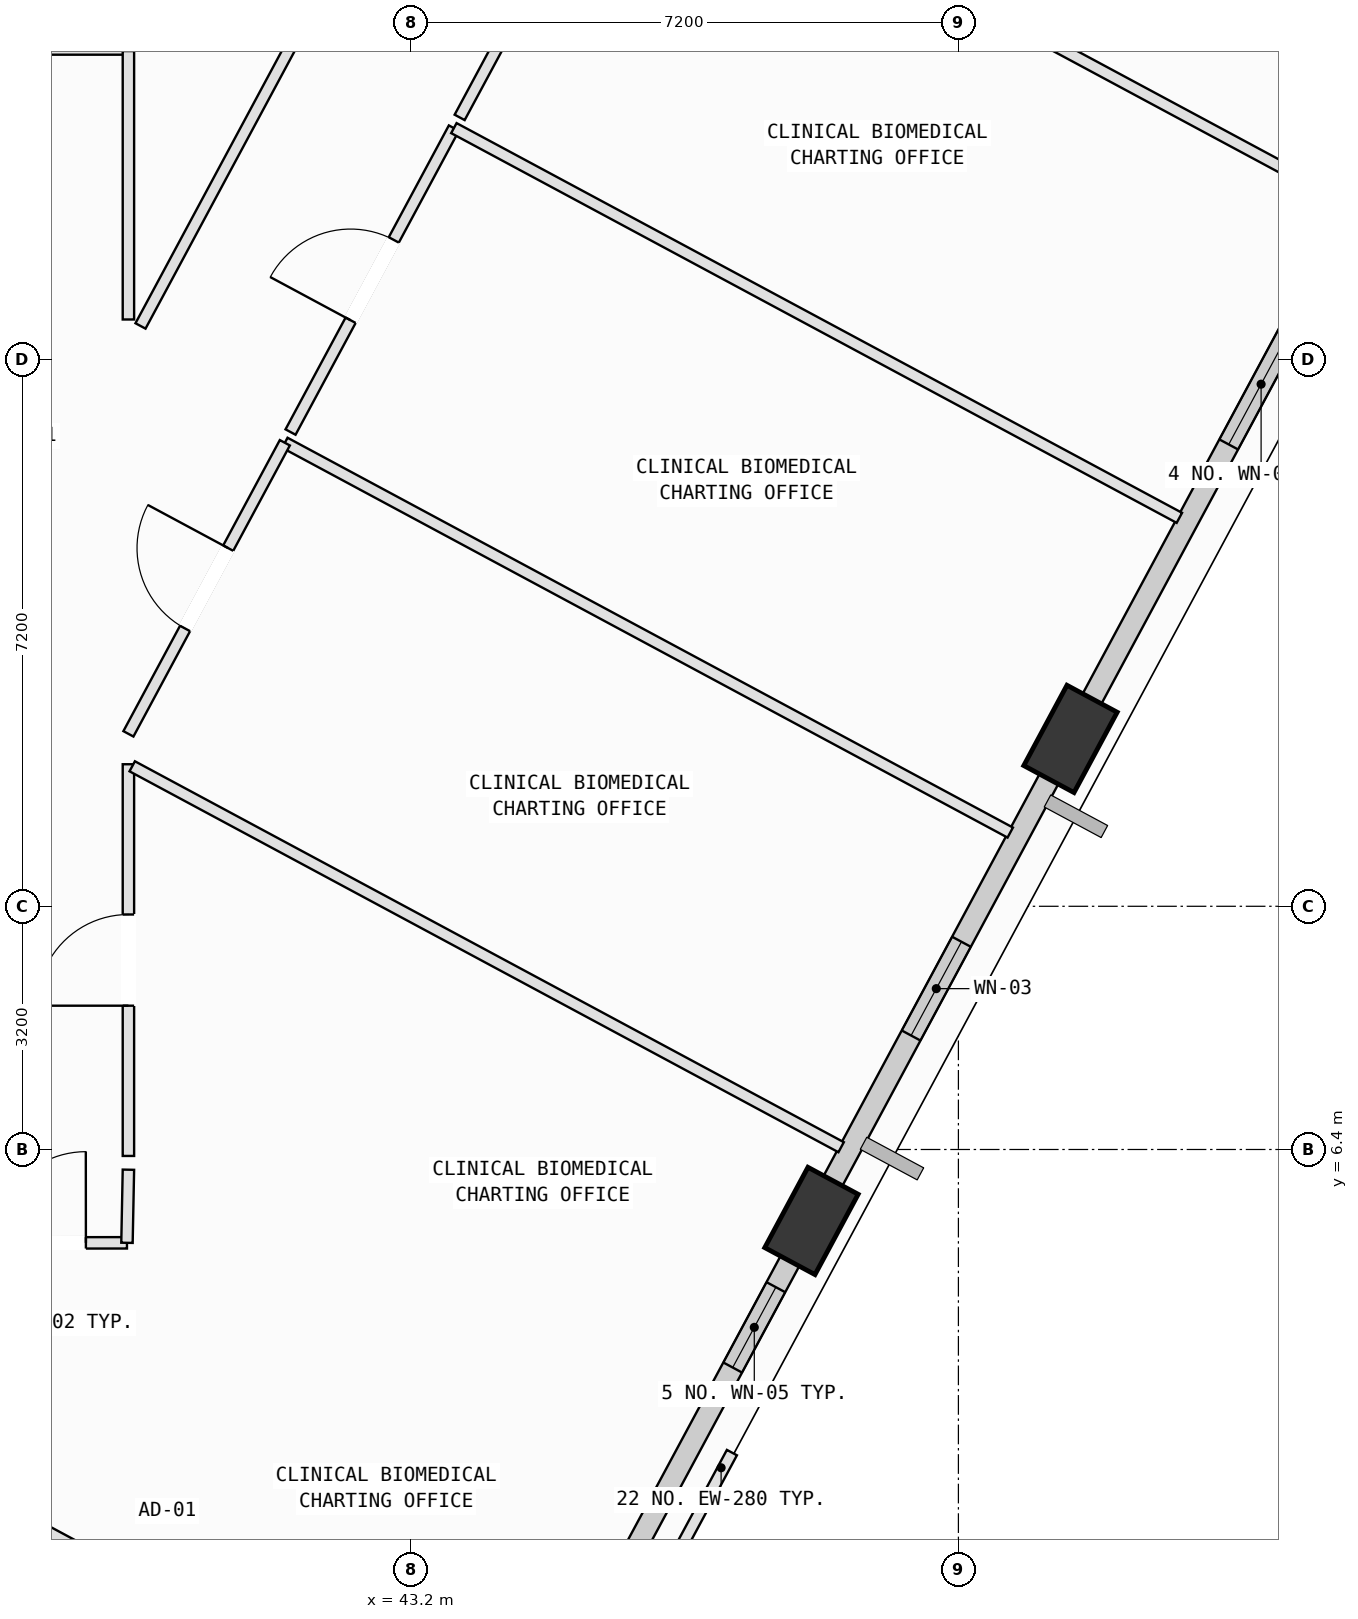
"""IFC4 building model, lengths in metres.
Left out: names, types, materials, properties, quantities, classifications, styles, units other than length and angle.
Written with IfcOpenShell. Run it as: python <this file> out.ifc"""

import sys

from ifc_helpers import new_model, si_unit, direction, frame, frame_2d, origin, origin_2d, place, context, subcontext, project, spatial, rectangle, extrude, element, fill, save


model = new_model("IFC4")
c1 = context("Model", 3, precision=1e-05, world=origin(), true_north=direction((0.0, 1.0)))
c2 = subcontext(c1, "Body", "Model", "MODEL_VIEW")
j1 = project(units=[si_unit("LENGTHUNIT", "METRE"), si_unit("PLANEANGLEUNIT", "RADIAN")], contexts=[c1])
p1 = place(None, origin())
s1 = spatial("IfcSite", under=j1, at=p1, CompositionType="ELEMENT")
p2 = place(p1, origin())
s2 = spatial("IfcBuilding", under=s1, at=p2, CompositionType="ELEMENT")
p3 = place(p2, frame((0.0, 0.0, 288.6)))
s3 = spatial("IfcBuildingStorey", under=s2, at=p3, CompositionType="ELEMENT", Elevation=288.6)
p4 = place(p3, frame((48.467, 5.46, 0.002), z_axis=(0.079258737557, 0.061936084026, 0.99492812505), x_axis=(-0.98201925884, -0.16669404877, 0.08860738892)))
e1 = element("IfcColumn", 1, at=p4, inside=s3, PredefinedType="COLUMN", context=c2, shape_type="SweptSolid", body=[
    extrude(rectangle(XDim=1.2, YDim=0.75, at=origin_2d()), origin(), (0.0, 0.0, 1.0), 4.017),
])
p5 = place(p3, frame((51.875, 11.802, 0.002), z_axis=(0.053042740852, 0.075853552572, 0.995707138774), x_axis=(-0.890530917938, -0.447556403311, 0.081534962146)))
e2 = element("IfcColumn", 2, at=p5, inside=s3, PredefinedType="COLUMN", context=c2, shape_type="SweptSolid", body=[
    extrude(rectangle(XDim=1.2, YDim=0.75, at=origin_2d()), origin(), (0.0, 0.0, 1.0), 4.014),
])
p6 = place(p3, frame((55.282, 18.145, 0.002), z_axis=(0.026701241209, 0.089713737548, 0.99560960673), x_axis=(-0.70383349377, -0.705563431999, 0.082453965787)))
e3 = element("IfcColumn", 3, at=p6, inside=s3, PredefinedType="COLUMN", context=c2, shape_type="SweptSolid", body=[
    extrude(rectangle(XDim=1.2, YDim=0.75, at=origin_2d()), origin(), (0.0, 0.0, 1.0), 4.014),
])
p7 = place(p3, frame((48.37, 5.28, 0.0), z_axis=(0.0, 0.0, 1.0), x_axis=(-0.473335362581, -0.880882304584, 0.0)))
e4 = element("IfcWall", 4, at=p7, inside=s3, PredefinedType="SOLIDWALL", context=c2, shape_type="SweptSolid", body=[
    extrude(rectangle(XDim=6.438, YDim=0.28, at=frame_2d((3.219, 0.0))), origin(), (0.0, 0.0, 1.0), 3.265),
])
p8 = place(p7, frame((0.785, 0.0, 0.75)))
e5 = element("IfcOpeningElement", 5, at=p8, cuts=e4, PredefinedType="OPENING", context=c2, shape_type="SweptSolid", body=[
    extrude(rectangle(XDim=1.2, YDim=1.75, at=frame_2d((0.6, 0.875))), frame((0.0, 0.15, 0.0), z_axis=(0.0, -1.0, 0.0), x_axis=(1.0, 0.0, 0.0)), (0.0, 0.0, 1.0), 0.3),
])
p9 = place(p7, frame((4.705, 0.0, 0.75)))
e6 = element("IfcOpeningElement", 6, at=p9, cuts=e4, PredefinedType="OPENING", context=c2, shape_type="SweptSolid", body=[
    extrude(rectangle(XDim=1.2, YDim=1.75, at=frame_2d((0.6, 0.875))), frame((0.0, 0.15, 0.0), z_axis=(0.0, -1.0, 0.0), x_axis=(1.0, 0.0, 0.0)), (0.0, 0.0, 1.0), 0.3),
])
p10 = place(p3, frame((51.774, 11.615, 0.0), z_axis=(0.0, 0.0, 1.0), x_axis=(-0.473332354162, -0.880883921129, 0.0)))
e7 = element("IfcWall", 7, at=p10, inside=s3, PredefinedType="SOLIDWALL", context=c2, shape_type="SweptSolid", body=[
    extrude(rectangle(XDim=6.413, YDim=0.28, at=frame_2d((3.207, 0.0))), origin(), (0.0, 0.0, 1.0), 3.265),
])
p11 = place(p10, frame((2.818, 0.0, 0.75)))
e8 = element("IfcOpeningElement", 8, at=p11, cuts=e7, PredefinedType="OPENING", context=c2, shape_type="SweptSolid", body=[
    extrude(rectangle(XDim=1.4, YDim=1.85, at=frame_2d((0.7, 0.925))), frame((0.0, 0.15, 0.0), z_axis=(0.0, -1.0, 0.0), x_axis=(1.0, 0.0, 0.0)), (0.0, 0.0, 1.0), 0.3),
])
p12 = place(p3, frame((55.182, 17.958, 0.0), z_axis=(0.0, 0.0, 1.0), x_axis=(-0.47331339391, -0.880894108929, 0.0)))
e9 = element("IfcWall", 9, at=p12, inside=s3, PredefinedType="SOLIDWALL", context=c2, shape_type="SweptSolid", body=[
    extrude(rectangle(XDim=6.407, YDim=0.28, at=frame_2d((3.204, 0.0))), origin(), (0.0, 0.0, 1.0), 3.265),
])
p13 = place(p12, frame((0.79, 0.0, 0.75)))
e10 = element("IfcOpeningElement", 10, at=p13, cuts=e9, PredefinedType="OPENING", context=c2, shape_type="SweptSolid", body=[
    extrude(rectangle(XDim=1.8, YDim=2.05, at=frame_2d((0.9, 1.025))), frame((0.0, 0.15, 0.0), z_axis=(0.0, -1.0, 0.0), x_axis=(1.0, 0.0, 0.0)), (0.0, 0.0, 1.0), 0.3),
])
p14 = place(p3, frame((34.864, 3.278, 0.0), z_axis=(0.0, 0.0, 1.0), x_axis=(0.880889698019, -0.473321603062, 0.0)))
e11 = element("IfcWall", 11, at=p14, inside=s3, PredefinedType="PARTITIONING", context=c2, shape_type="SweptSolid", body=[
    extrude(rectangle(XDim=10.834, YDim=0.15, at=frame_2d((5.417, 0.0))), origin(), (0.0, 0.0, 1.0), 3.78),
])
p15 = place(p14, frame((4.987, 0.0, 0.0)))
e12 = element("IfcOpeningElement", 12, at=p15, cuts=e11, PredefinedType="OPENING", context=c2, shape_type="SweptSolid", body=[
    extrude(rectangle(XDim=0.86, YDim=2.06, at=frame_2d((0.43, 1.03))), frame((0.0, 0.085, 0.0), z_axis=(0.0, -1.0, 0.0), x_axis=(1.0, 0.0, 0.0)), (0.0, 0.0, 1.0), 0.17),
])
p16 = place(p3, frame((37.18, 5.17, 0.0), z_axis=(0.0, 0.0, 1.0), x_axis=(0.999999536038, 0.000963287576, 0.0)))
e13 = element("IfcWall", 13, at=p16, inside=s3, PredefinedType="PARTITIONING", context=c2, shape_type="SweptSolid", body=[
    extrude(rectangle(XDim=2.281, YDim=0.15, at=frame_2d((1.141, 0.0))), origin(), (0.0, 0.0, 1.0), 3.78),
])
p17 = place(p16, frame((0.541, 0.0, 0.0)))
e14 = element("IfcOpeningElement", 14, at=p17, cuts=e13, PredefinedType="OPENING", context=c2, shape_type="SweptSolid", body=[
    extrude(rectangle(XDim=1.2, YDim=2.15, at=frame_2d((0.6, 1.075))), frame((0.0, 0.085, 0.0), z_axis=(0.0, -1.0, 0.0), x_axis=(1.0, 0.0, 0.0)), (0.0, 0.0, 1.0), 0.17),
])
p18 = place(p3, frame((39.461, 5.172, 0.0), z_axis=(0.0, 0.0, 1.0), x_axis=(0.019793076049, 0.999804097881, 0.0)))
e15 = element("IfcWall", 15, at=p18, inside=s3, PredefinedType="PARTITIONING", context=c2, shape_type="SweptSolid", body=[
    extrude(rectangle(XDim=0.962, YDim=0.15, at=frame_2d((0.481, 0.0))), origin(), (0.0, 0.0, 1.0), 3.78),
])
p19 = place(p3, frame((48.941, 5.857, 0.0), z_axis=(0.0, 0.0, 1.0), x_axis=(-0.473595091589, -0.880742691836, 0.0)))
e16 = element("IfcWall", 16, at=p19, inside=s3, PredefinedType="PARTITIONING", context=c2, shape_type="SweptSolid", body=[
    extrude(rectangle(XDim=0.779, YDim=0.15, at=frame_2d((0.389, 0.0))), origin(), (0.0, 0.0, 1.0), 3.265),
])
p20 = place(p3, frame((39.48, 6.315, 0.0), z_axis=(0.0, 0.0, 1.0), x_axis=(0.0, 1.0, 0.0)))
e17 = element("IfcWall", 17, at=p20, inside=s3, PredefinedType="PARTITIONING", context=c2, shape_type="SweptSolid", body=[
    extrude(rectangle(XDim=5.154, YDim=0.15, at=frame_2d((2.577, 0.0))), origin(), (0.0, 0.0, 1.0), 3.78),
])
p21 = place(p20, frame((1.977, 0.0, 0.0)))
e18 = element("IfcOpeningElement", 18, at=p21, cuts=e17, PredefinedType="OPENING", context=c2, shape_type="SweptSolid", body=[
    extrude(rectangle(XDim=1.2, YDim=2.15, at=frame_2d((0.6, 1.075))), frame((0.0, 0.085, 0.0), z_axis=(0.0, -1.0, 0.0), x_axis=(1.0, 0.0, 0.0)), (0.0, 0.0, 1.0), 0.17),
])
p22 = place(p3, frame((39.53, 11.442, 0.0), z_axis=(0.0, 0.0, 1.0), x_axis=(0.880873551666, -0.473351651497, 0.0)))
e19 = element("IfcWall", 19, at=p22, inside=s3, PredefinedType="PARTITIONING", context=c2, shape_type="SweptSolid", body=[
    extrude(rectangle(XDim=10.588, YDim=0.15, at=frame_2d((5.294, 0.0))), origin(), (0.0, 0.0, 1.0), 3.78),
])
p23 = place(p3, frame((41.538, 15.699, 0.0), z_axis=(0.0, 0.0, 1.0), x_axis=(0.880861511404, -0.47337405688, 0.0)))
e20 = element("IfcWall", 20, at=p23, inside=s3, PredefinedType="PARTITIONING", context=c2, shape_type="SweptSolid", body=[
    extrude(rectangle(XDim=10.835, YDim=0.15, at=frame_2d((5.417, 0.0))), origin(), (0.0, 0.0, 1.0), 3.78),
])
p24 = place(p3, frame((39.48, 11.869, 0.0), z_axis=(0.0, 0.0, 1.0), x_axis=(0.473342913311, 0.880878247216, 0.0)))
e21 = element("IfcWall", 21, at=p24, inside=s3, PredefinedType="PARTITIONING", context=c2, shape_type="SweptSolid", body=[
    extrude(rectangle(XDim=4.348, YDim=0.15, at=frame_2d((2.174, 0.0))), origin(), (0.0, 0.0, 1.0), 3.78),
])
p25 = place(p24, frame((1.574, 0.0, 0.0)))
e22 = element("IfcOpeningElement", 22, at=p25, cuts=e21, PredefinedType="OPENING", context=c2, shape_type="SweptSolid", body=[
    extrude(rectangle(XDim=1.2, YDim=2.15, at=frame_2d((0.6, 1.075))), frame((0.0, 0.085, 0.0), z_axis=(0.0, -1.0, 0.0), x_axis=(1.0, 0.0, 0.0)), (0.0, 0.0, 1.0), 0.17),
])
p26 = place(p3, frame((41.613, 15.84, 0.0), z_axis=(0.0, 0.0, 1.0), x_axis=(0.47334923321, 0.880874851168, 0.0)))
e23 = element("IfcWall", 23, at=p26, inside=s3, PredefinedType="PARTITIONING", context=c2, shape_type="SweptSolid", body=[
    extrude(rectangle(XDim=4.54, YDim=0.15, at=frame_2d((2.27, 0.0))), origin(), (0.0, 0.0, 1.0), 3.78),
])
p27 = place(p26, frame((1.67, 0.0, 0.0)))
e24 = element("IfcOpeningElement", 24, at=p27, cuts=e23, PredefinedType="OPENING", context=c2, shape_type="SweptSolid", body=[
    extrude(rectangle(XDim=1.2, YDim=2.15, at=frame_2d((0.6, 1.075))), frame((0.0, 0.085, 0.0), z_axis=(0.0, -1.0, 0.0), x_axis=(1.0, 0.0, 0.0)), (0.0, 0.0, 1.0), 0.17),
])
p28 = place(p3, frame((43.762, 19.839, 0.0), z_axis=(0.0, 0.0, 1.0), x_axis=(0.880909888867, -0.473284024341, 0.0)))
e25 = element("IfcWall", 25, at=p28, inside=s3, PredefinedType="PARTITIONING", context=c2, shape_type="SweptSolid", body=[
    extrude(rectangle(XDim=10.835, YDim=0.15, at=frame_2d((5.417, 0.0))), origin(), (0.0, 0.0, 1.0), 3.78),
])
p29 = place(p3, frame((52.353, 12.205, 0.0), z_axis=(0.0, 0.0, 1.0), x_axis=(-0.473714563566, -0.880678438629, 0.0)))
e26 = element("IfcWall", 26, at=p29, inside=s3, PredefinedType="PARTITIONING", context=c2, shape_type="SweptSolid", body=[
    extrude(rectangle(XDim=0.794, YDim=0.15, at=frame_2d((0.397, 0.0))), origin(), (0.0, 0.0, 1.0), 3.265),
])
p30 = place(p3, frame((43.838, 19.98, 0.0), z_axis=(0.0, 0.0, 1.0), x_axis=(0.473390959729, 0.880852427622, 0.0)))
e27 = element("IfcWall", 27, at=p30, inside=s3, PredefinedType="PARTITIONING", context=c2, shape_type="SweptSolid", body=[
    extrude(rectangle(XDim=4.54, YDim=0.15, at=frame_2d((2.27, 0.0))), origin(), (0.0, 0.0, 1.0), 3.78),
])
p31 = place(p30, frame((1.67, 0.0, 0.0)))
e28 = element("IfcOpeningElement", 28, at=p31, cuts=e27, PredefinedType="OPENING", context=c2, shape_type="SweptSolid", body=[
    extrude(rectangle(XDim=1.2, YDim=2.15, at=frame_2d((0.6, 1.075))), frame((0.0, 0.085, 0.0), z_axis=(0.0, -1.0, 0.0), x_axis=(1.0, 0.0, 0.0)), (0.0, 0.0, 1.0), 0.17),
])
p32 = place(p3, frame((45.987, 23.979, 0.0), z_axis=(0.0, 0.0, 1.0), x_axis=(0.880899093264, -0.473304117336, 0.0)))
e29 = element("IfcWall", 29, at=p32, inside=s3, PredefinedType="PARTITIONING", context=c2, shape_type="SweptSolid", body=[
    extrude(rectangle(XDim=10.834, YDim=0.15, at=frame_2d((5.417, 0.0))), origin(), (0.0, 0.0, 1.0), 3.78),
])
p33 = place(p3, frame((39.45, 20.88, 0.0), z_axis=(0.0, 0.0, 1.0), x_axis=(-1.0, 0.0, 0.0)))
e30 = element("IfcWall", 30, at=p33, inside=s3, PredefinedType="PARTITIONING", context=c2, shape_type="SweptSolid", body=[
    extrude(rectangle(XDim=6.293, YDim=0.15, at=frame_2d((3.146, 0.0))), origin(), (0.0, 0.0, 1.0), 3.415),
])
p34 = place(p33, frame((2.546, 0.0, 0.0)))
e31 = element("IfcOpeningElement", 31, at=p34, cuts=e30, PredefinedType="OPENING", context=c2, shape_type="SweptSolid", body=[
    extrude(rectangle(XDim=1.2, YDim=2.15, at=frame_2d((0.6, 1.075))), frame((0.0, 0.085, 0.0), z_axis=(0.0, -1.0, 0.0), x_axis=(1.0, 0.0, 0.0)), (0.0, 0.0, 1.0), 0.17),
])
p35 = place(p3, frame((42.546, 22.647, 0.0), z_axis=(0.0, 0.0, 1.0), x_axis=(-0.473270026335, -0.880917409394, 0.0)))
e32 = element("IfcWall", 32, at=p35, inside=s3, PredefinedType="PARTITIONING", context=c2, shape_type="SweptSolid", body=[
    extrude(rectangle(XDim=6.142, YDim=0.15, at=frame_2d((3.071, 0.0))), origin(), (0.0, 0.0, 1.0), 3.78),
])
p36 = place(p3, frame((39.48, 17.321, 0.0), z_axis=(0.0, 0.0, 1.0), x_axis=(0.0, 1.0, 0.0)))
e33 = element("IfcWall", 33, at=p36, inside=s3, PredefinedType="PARTITIONING", context=c2, shape_type="SweptSolid", body=[
    extrude(rectangle(XDim=3.532, YDim=0.15, at=frame_2d((1.766, 0.0))), origin(), (0.0, 0.0, 1.0), 3.78),
])
p37 = place(p3, frame((47.42, 2.412, 0.0), z_axis=(0.0, 0.0, 1.0), x_axis=(-0.473368134978, -0.880864693802, 0.0)))
e34 = element("IfcWall", 34, at=p37, inside=s3, PredefinedType="PARTITIONING", context=c2, shape_type="SweptSolid", body=[
    extrude(rectangle(XDim=6.189, YDim=0.15, at=frame_2d((3.095, 0.0))), origin(), (0.0, 0.0, 1.0), 3.265),
])
p38 = place(p8, origin())
e35 = element("IfcWindow", 35, at=p38, inside=s3, PartitioningType="SINGLE_PANEL", PredefinedType="WINDOW", context=c2, shape_type="SweptSolid", body=[
    extrude(rectangle(XDim=1.2, YDim=1.75, at=frame_2d((0.6, 0.875))), frame((0.0, 0.03, 0.0), z_axis=(0.0, -1.0, 0.0), x_axis=(1.0, 0.0, 0.0)), (0.0, 0.0, 1.0), 0.06),
])
fill(e5, e35)
p39 = place(p11, origin())
e36 = element("IfcWindow", 36, at=p39, inside=s3, PartitioningType="SINGLE_PANEL", PredefinedType="WINDOW", context=c2, shape_type="SweptSolid", body=[
    extrude(rectangle(XDim=1.4, YDim=1.85, at=frame_2d((0.7, 0.925))), frame((0.0, 0.03, 0.0), z_axis=(0.0, -1.0, 0.0), x_axis=(1.0, 0.0, 0.0)), (0.0, 0.0, 1.0), 0.06),
])
fill(e8, e36)
p40 = place(p13, origin())
e37 = element("IfcWindow", 37, at=p40, inside=s3, PartitioningType="SINGLE_PANEL", PredefinedType="WINDOW", context=c2, shape_type="SweptSolid", body=[
    extrude(rectangle(XDim=1.8, YDim=2.05, at=frame_2d((0.9, 1.025))), frame((0.0, 0.03, 0.0), z_axis=(0.0, -1.0, 0.0), x_axis=(1.0, 0.0, 0.0)), (0.0, 0.0, 1.0), 0.06),
])
fill(e10, e37)
p41 = place(p17, origin())
e38 = element("IfcDoor", 38, at=p41, inside=s3, OperationType="SINGLE_SWING_RIGHT", PredefinedType="DOOR", context=c2, shape_type="SweptSolid", body=[
    extrude(rectangle(XDim=1.2, YDim=2.15, at=frame_2d((0.6, 1.075))), frame((0.0, 0.025, 0.0), z_axis=(0.0, -1.0, 0.0), x_axis=(1.0, 0.0, 0.0)), (0.0, 0.0, 1.0), 0.05),
])
fill(e14, e38)
p42 = place(p21, origin())
e39 = element("IfcDoor", 39, at=p42, inside=s3, OperationType="SINGLE_SWING_LEFT", PredefinedType="DOOR", context=c2, shape_type="SweptSolid", body=[
    extrude(rectangle(XDim=1.2, YDim=2.15, at=frame_2d((0.6, 1.075))), frame((0.0, 0.025, 0.0), z_axis=(0.0, -1.0, 0.0), x_axis=(1.0, 0.0, 0.0)), (0.0, 0.0, 1.0), 0.05),
])
fill(e18, e39)
p43 = place(p25, origin())
e40 = element("IfcDoor", 40, at=p43, inside=s3, OperationType="SINGLE_SWING_RIGHT", PredefinedType="DOOR", context=c2, shape_type="SweptSolid", body=[
    extrude(rectangle(XDim=1.2, YDim=2.15, at=frame_2d((0.6, 1.075))), frame((0.0, 0.025, 0.0), z_axis=(0.0, -1.0, 0.0), x_axis=(1.0, 0.0, 0.0)), (0.0, 0.0, 1.0), 0.05),
])
fill(e22, e40)
p44 = place(p27, origin())
e41 = element("IfcDoor", 41, at=p44, inside=s3, OperationType="SINGLE_SWING_LEFT", PredefinedType="DOOR", context=c2, shape_type="SweptSolid", body=[
    extrude(rectangle(XDim=1.2, YDim=2.15, at=frame_2d((0.6, 1.075))), frame((0.0, 0.025, 0.0), z_axis=(0.0, -1.0, 0.0), x_axis=(1.0, 0.0, 0.0)), (0.0, 0.0, 1.0), 0.05),
])
fill(e24, e41)
save(model, sys.argv[1])
